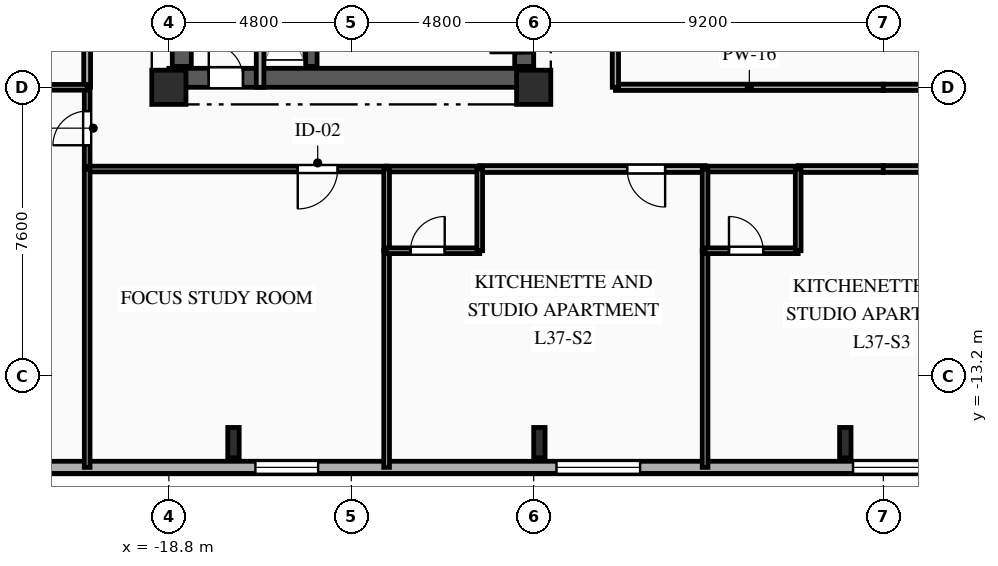
"""IFC4 building model, lengths in metres.
Left out: names, types, materials, properties, quantities, classifications, styles, units other than length and angle.
Written with IfcOpenShell. Run it as: python <this file> out.ifc"""

import sys

from ifc_helpers import new_model, si_unit, direction, frame, frame_2d, origin, origin_2d, place, context, subcontext, project, spatial, rectangle, i_section, extrude, element, fill, save


model = new_model("IFC4")
c1 = context("Model", 3, precision=1e-05, world=origin(), true_north=direction((0.0, 1.0)))
c2 = subcontext(c1, "Body", "Model", "MODEL_VIEW")
j1 = project(units=[si_unit("LENGTHUNIT", "METRE"), si_unit("PLANEANGLEUNIT", "RADIAN")], contexts=[c1])
p1 = place(None, origin())
s1 = spatial("IfcSite", under=j1, at=p1, CompositionType="ELEMENT")
p2 = place(p1, origin())
s2 = spatial("IfcBuilding", under=s1, at=p2, CompositionType="ELEMENT")
p3 = place(p2, frame((0.0, 0.0, 134.35)))
s3 = spatial("IfcBuildingStorey", under=s2, at=p3, CompositionType="ELEMENT", Elevation=134.35)
for number, where, z_axis, x_axis in (
    (1, (-18.8, -5.6, 0.0), (0.0, 0.0, 1.0), (1.0, 0.0, 0.0)),
    (2, (-9.2, -5.6, 0.0), (0.0, 0.0, 1.0), (1.0, 0.0, 0.0)),
):
    element("IfcColumn", number, at=place(p3, frame(where, z_axis=z_axis, x_axis=x_axis)), inside=s3, PredefinedType="COLUMN", context=c2, shape_type="SweptSolid", body=[
        extrude(rectangle(XDim=0.9, YDim=0.9, at=origin_2d()), origin(), (0.0, 0.0, 1.0), 3.35),
    ])
for number, where, z_axis, x_axis in (
    (3, (-17.1, -14.95, 0.0), (0.0, 0.0, 1.0), (1.0, 0.0, 0.0)),
    (4, (-9.05, -14.95, 0.0), (0.0, 0.0, 1.0), (1.0, 0.0, 0.0)),
    (5, (-1.0, -14.95, 0.0), (0.0, 0.0, 1.0), (1.0, 0.0, 0.0)),
):
    element("IfcColumn", number, at=place(p3, frame(where, z_axis=z_axis, x_axis=x_axis)), inside=s3, PredefinedType="COLUMN", context=c2, shape_type="SweptSolid", body=[
        extrude(i_section(OverallWidth=0.3, OverallDepth=0.8, WebThickness=0.018, FlangeThickness=0.033, FilletRadius=0.03, at=origin_2d()), origin(), (0.0, 0.0, 1.0), 3.35),
    ])
p4 = place(p3, frame((23.8, -15.6, 0.0), z_axis=(0.0, 0.0, 1.0), x_axis=(-1.0, 0.0, 0.0)))
e6 = element("IfcWall", 6, at=p4, inside=s3, PredefinedType="SOLIDWALL", context=c2, shape_type="SweptSolid", body=[
    extrude(rectangle(XDim=49.6, YDim=0.32, at=frame_2d((24.8, 0.0))), origin(), (0.0, 0.0, 1.0), 3.04),
])
p5 = place(p4, frame((1.13, 0.0, 0.85)))
e7 = element("IfcOpeningElement", 7, at=p5, cuts=e6, PredefinedType="OPENING", context=c2, shape_type="SweptSolid", body=[
    extrude(rectangle(XDim=1.1, YDim=1.85, at=frame_2d((0.55, 0.925))), frame((0.0, 0.17, 0.0), z_axis=(0.0, -1.0, 0.0), x_axis=(1.0, 0.0, 0.0)), (0.0, 0.0, 1.0), 0.34),
])
p6 = place(p4, frame((6.495, 0.0, 0.85)))
e8 = element("IfcOpeningElement", 8, at=p6, cuts=e6, PredefinedType="OPENING", context=c2, shape_type="SweptSolid", body=[
    extrude(rectangle(XDim=1.65, YDim=1.85, at=frame_2d((0.825, 0.925))), frame((0.0, 0.17, 0.0), z_axis=(0.0, -1.0, 0.0), x_axis=(1.0, 0.0, 0.0)), (0.0, 0.0, 1.0), 0.34),
])
p7 = place(p4, frame((13.996, 0.0, 0.85)))
e9 = element("IfcOpeningElement", 9, at=p7, cuts=e6, PredefinedType="OPENING", context=c2, shape_type="SweptSolid", body=[
    extrude(rectangle(XDim=2.2, YDim=1.85, at=frame_2d((1.1, 0.925))), frame((0.0, 0.17, 0.0), z_axis=(0.0, -1.0, 0.0), x_axis=(1.0, 0.0, 0.0)), (0.0, 0.0, 1.0), 0.34),
])
p8 = place(p4, frame((22.396, 0.0, 0.85)))
e10 = element("IfcOpeningElement", 10, at=p8, cuts=e6, PredefinedType="OPENING", context=c2, shape_type="SweptSolid", body=[
    extrude(rectangle(XDim=2.2, YDim=1.85, at=frame_2d((1.1, 0.925))), frame((0.0, 0.17, 0.0), z_axis=(0.0, -1.0, 0.0), x_axis=(1.0, 0.0, 0.0)), (0.0, 0.0, 1.0), 0.34),
])
p9 = place(p4, frame((30.2, 0.0, 0.85)))
e11 = element("IfcOpeningElement", 11, at=p9, cuts=e6, PredefinedType="OPENING", context=c2, shape_type="SweptSolid", body=[
    extrude(rectangle(XDim=2.2, YDim=1.85, at=frame_2d((1.1, 0.925))), frame((0.0, 0.17, 0.0), z_axis=(0.0, -1.0, 0.0), x_axis=(1.0, 0.0, 0.0)), (0.0, 0.0, 1.0), 0.34),
])
p10 = place(p4, frame((38.673, 0.0, 0.85)))
e12 = element("IfcOpeningElement", 12, at=p10, cuts=e6, PredefinedType="OPENING", context=c2, shape_type="SweptSolid", body=[
    extrude(rectangle(XDim=1.65, YDim=1.85, at=frame_2d((0.825, 0.925))), frame((0.0, 0.17, 0.0), z_axis=(0.0, -1.0, 0.0), x_axis=(1.0, 0.0, 0.0)), (0.0, 0.0, 1.0), 0.34),
])
p11 = place(p4, frame((46.175, 0.0, 0.85)))
e13 = element("IfcOpeningElement", 13, at=p11, cuts=e6, PredefinedType="OPENING", context=c2, shape_type="SweptSolid", body=[
    extrude(rectangle(XDim=1.65, YDim=1.85, at=frame_2d((0.825, 0.925))), frame((0.0, 0.17, 0.0), z_axis=(0.0, -1.0, 0.0), x_axis=(1.0, 0.0, 0.0)), (0.0, 0.0, 1.0), 0.34),
])
p12 = place(p3, frame((-18.8, -5.35, 0.0), z_axis=(0.0, 0.0, 1.0), x_axis=(1.0, 0.0, 0.0)))
e14 = element("IfcWall", 14, at=p12, inside=s3, PredefinedType="SHEAR", context=c2, shape_type="SweptSolid", body=[
    extrude(rectangle(XDim=9.6, YDim=0.5, at=frame_2d((4.8, 0.0))), origin(), (0.0, 0.0, 1.0), 3.04),
])
p13 = place(p12, frame((1.05, 0.0, 0.0)))
e15 = element("IfcOpeningElement", 15, at=p13, cuts=e14, PredefinedType="OPENING", context=c2, shape_type="SweptSolid", body=[
    extrude(rectangle(XDim=0.9, YDim=2.1, at=frame_2d((0.45, 1.05))), frame((0.0, 0.26, 0.0), z_axis=(0.0, -1.0, 0.0), x_axis=(1.0, 0.0, 0.0)), (0.0, 0.0, 1.0), 0.52),
])
p14 = place(p3, frame((-18.46, -5.05, 0.0), z_axis=(0.0, 0.0, 1.0), x_axis=(0.0, 1.0, 0.0)))
e16 = element("IfcWall", 16, at=p14, inside=s3, PredefinedType="SHEAR", context=c2, shape_type="SweptSolid", body=[
    extrude(rectangle(XDim=10.1, YDim=0.5, at=frame_2d((5.05, 0.0))), origin(), (0.0, 0.0, 1.0), 3.04),
])
p15 = place(p3, frame((-9.45, -5.05, 0.0), z_axis=(0.0, 0.0, 1.0), x_axis=(0.0, 1.0, 0.0)))
e17 = element("IfcWall", 17, at=p15, inside=s3, PredefinedType="SHEAR", context=c2, shape_type="SweptSolid", body=[
    extrude(rectangle(XDim=10.1, YDim=0.5, at=frame_2d((5.05, 0.0))), origin(), (0.0, 0.0, 1.0), 3.04),
])
p16 = place(p15, frame((7.15, 0.0, 0.0)))
e18 = element("IfcOpeningElement", 18, at=p16, cuts=e17, PredefinedType="OPENING", context=c2, shape_type="SweptSolid", body=[
    extrude(rectangle(XDim=0.9, YDim=2.1, at=frame_2d((0.45, 1.05))), frame((0.0, 0.26, 0.0), z_axis=(0.0, -1.0, 0.0), x_axis=(1.0, 0.0, 0.0)), (0.0, 0.0, 1.0), 0.52),
])
p17 = place(p15, frame((2.4, 0.0, 0.0)))
e19 = element("IfcOpeningElement", 19, at=p17, cuts=e17, PredefinedType="OPENING", context=c2, shape_type="SweptSolid", body=[
    extrude(rectangle(XDim=1.2, YDim=2.15, at=frame_2d((0.6, 1.075))), frame((0.0, 0.26, 0.0), z_axis=(0.0, -1.0, 0.0), x_axis=(1.0, 0.0, 0.0)), (0.0, 0.0, 1.0), 0.52),
])
p18 = place(p15, frame((0.35, 0.0, 0.0)))
e20 = element("IfcOpeningElement", 20, at=p18, cuts=e17, PredefinedType="OPENING", context=c2, shape_type="SweptSolid", body=[
    extrude(rectangle(XDim=0.9, YDim=2.1, at=frame_2d((0.45, 1.05))), frame((0.0, 0.26, 0.0), z_axis=(0.0, -1.0, 0.0), x_axis=(1.0, 0.0, 0.0)), (0.0, 0.0, 1.0), 0.52),
])
p19 = place(p15, frame((5.0, 0.0, 0.0)))
e21 = element("IfcOpeningElement", 21, at=p19, cuts=e17, PredefinedType="OPENING", context=c2, shape_type="SweptSolid", body=[
    extrude(rectangle(XDim=0.9, YDim=2.1, at=frame_2d((0.45, 1.05))), frame((0.0, 0.26, 0.0), z_axis=(0.0, -1.0, 0.0), x_axis=(1.0, 0.0, 0.0)), (0.0, 0.0, 1.0), 0.52),
])
p20 = place(p3, frame((-15.05, -5.05, 0.0), z_axis=(0.0, 0.0, 1.0), x_axis=(0.0, 1.0, 0.0)))
e22 = element("IfcWall", 22, at=p20, inside=s3, PredefinedType="SHEAR", context=c2, shape_type="SweptSolid", body=[
    extrude(rectangle(XDim=10.1, YDim=0.3, at=frame_2d((5.05, 0.0))), origin(), (0.0, 0.0, 1.0), 3.04),
])
p21 = place(p3, frame((-16.4, -5.6, 0.0), z_axis=(0.0, 0.0, 1.0), x_axis=(0.0, 1.0, 0.0)))
e23 = element("IfcWall", 23, at=p21, inside=s3, PredefinedType="PARTITIONING", context=c2, shape_type="SweptSolid", body=[
    extrude(rectangle(XDim=3.49, YDim=0.2, at=frame_2d((1.745, 0.0))), origin(), (0.0, 0.0, 1.0), 3.04),
])
p22 = place(p3, frame((-20.95, -7.75, 0.0), z_axis=(0.0, 0.0, 1.0), x_axis=(0.0, 1.0, 0.0)))
e24 = element("IfcWall", 24, at=p22, inside=s3, PredefinedType="PARTITIONING", context=c2, shape_type="SweptSolid", body=[
    extrude(rectangle(XDim=2.15, YDim=0.15, at=frame_2d((1.075, 0.0))), origin(), (0.0, 0.0, 1.0), 3.04),
])
p23 = place(p22, frame((0.625, 0.0, 0.0)))
e25 = element("IfcOpeningElement", 25, at=p23, cuts=e24, PredefinedType="OPENING", context=c2, shape_type="SweptSolid", body=[
    extrude(rectangle(XDim=0.9, YDim=2.1, at=frame_2d((0.45, 1.05))), frame((0.0, 0.085, 0.0), z_axis=(0.0, -1.0, 0.0), x_axis=(1.0, 0.0, 0.0)), (0.0, 0.0, 1.0), 0.17),
])
p24 = place(p3, frame((-13.07, -7.75, 0.0), z_axis=(0.0, 0.0, 1.0), x_axis=(-1.0, 0.0, 0.0)))
e26 = element("IfcWall", 26, at=p24, inside=s3, PredefinedType="PARTITIONING", context=c2, shape_type="SweptSolid", body=[
    extrude(rectangle(XDim=7.88, YDim=0.15, at=frame_2d((3.94, 0.0))), origin(), (0.0, 0.0, 1.0), 3.04),
])
p25 = place(p24, frame((1.289, 0.0, 0.0)))
e27 = element("IfcOpeningElement", 27, at=p25, cuts=e26, PredefinedType="OPENING", context=c2, shape_type="SweptSolid", body=[
    extrude(rectangle(XDim=1.05, YDim=2.15, at=frame_2d((0.525, 1.075))), frame((0.0, 0.085, 0.0), z_axis=(0.0, -1.0, 0.0), x_axis=(1.0, 0.0, 0.0)), (0.0, 0.0, 1.0), 0.17),
])
p26 = place(p3, frame((-4.69, -7.75, 0.0), z_axis=(0.0, 0.0, 1.0), x_axis=(-1.0, 0.0, 0.0)))
e28 = element("IfcWall", 28, at=p26, inside=s3, PredefinedType="PARTITIONING", context=c2, shape_type="SweptSolid", body=[
    extrude(rectangle(XDim=5.93, YDim=0.18, at=frame_2d((2.965, 0.0))), origin(), (0.0, 0.0, 1.0), 3.04),
])
p27 = place(p26, frame((1.051, 0.0, 0.0)))
e29 = element("IfcOpeningElement", 29, at=p27, cuts=e28, PredefinedType="OPENING", context=c2, shape_type="SweptSolid", body=[
    extrude(rectangle(XDim=1.0, YDim=2.15, at=frame_2d((0.5, 1.075))), frame((0.0, 0.1, 0.0), z_axis=(0.0, -1.0, 0.0), x_axis=(1.0, 0.0, 0.0)), (0.0, 0.0, 1.0), 0.2),
])
p28 = place(p3, frame((-10.62, -7.75, 0.0), z_axis=(0.0, 0.0, 1.0), x_axis=(-1.0, 0.0, 0.0)))
e30 = element("IfcWall", 30, at=p28, inside=s3, PredefinedType="PLUMBINGWALL", context=c2, shape_type="SweptSolid", body=[
    extrude(rectangle(XDim=2.45, YDim=0.15, at=frame_2d((1.225, 0.0))), origin(), (0.0, 0.0, 1.0), 3.04),
])
p29 = place(p3, frame((0.0, -7.75, 0.0), z_axis=(0.0, 0.0, 1.0), x_axis=(-1.0, 0.0, 0.0)))
e31 = element("IfcWall", 31, at=p29, inside=s3, PredefinedType="PARTITIONING", context=c2, shape_type="SweptSolid", body=[
    extrude(rectangle(XDim=2.24, YDim=0.18, at=frame_2d((1.12, 0.0))), origin(), (0.0, 0.0, 1.0), 3.04),
])
p30 = place(p3, frame((-2.24, -7.75, 0.0), z_axis=(0.0, 0.0, 1.0), x_axis=(-1.0, 0.0, 0.0)))
e32 = element("IfcWall", 32, at=p30, inside=s3, PredefinedType="PLUMBINGWALL", context=c2, shape_type="SweptSolid", body=[
    extrude(rectangle(XDim=2.45, YDim=0.15, at=frame_2d((1.225, 0.0))), origin(), (0.0, 0.0, 1.0), 3.04),
])
p31 = place(p3, frame((-7.05, -5.6, 0.0), z_axis=(0.0, 0.0, 1.0), x_axis=(1.0, 0.0, 0.0)))
e33 = element("IfcWall", 33, at=p31, inside=s3, PredefinedType="PARTITIONING", context=c2, shape_type="SweptSolid", body=[
    extrude(rectangle(XDim=7.05, YDim=0.165, at=frame_2d((3.525, 0.0))), origin(), (0.0, 0.0, 1.0), 2.525),
])
p32 = place(p3, frame((3.69, -7.75, 0.0), z_axis=(0.0, 0.0, 1.0), x_axis=(-1.0, 0.0, 0.0)))
e34 = element("IfcWall", 34, at=p32, inside=s3, PredefinedType="PARTITIONING", context=c2, shape_type="SweptSolid", body=[
    extrude(rectangle(XDim=3.69, YDim=0.18, at=frame_2d((1.845, 0.0))), origin(), (0.0, 0.0, 1.0), 3.04),
])
p33 = place(p32, frame((1.536, 0.0, 0.0)))
e35 = element("IfcOpeningElement", 35, at=p33, cuts=e34, PredefinedType="OPENING", context=c2, shape_type="SweptSolid", body=[
    extrude(rectangle(XDim=1.0, YDim=2.15, at=frame_2d((0.5, 1.075))), frame((0.0, 0.1, 0.0), z_axis=(0.0, -1.0, 0.0), x_axis=(1.0, 0.0, 0.0)), (0.0, 0.0, 1.0), 0.2),
])
p34 = place(p3, frame((0.0, -5.6, 0.0), z_axis=(0.0, 0.0, 1.0), x_axis=(1.0, 0.0, 0.0)))
e36 = element("IfcWall", 36, at=p34, inside=s3, PredefinedType="PARTITIONING", context=c2, shape_type="SweptSolid", body=[
    extrude(rectangle(XDim=7.05, YDim=0.165, at=frame_2d((3.525, 0.0))), origin(), (0.0, 0.0, 1.0), 2.525),
])
p35 = place(p3, frame((-20.95, -5.6, 0.0), z_axis=(0.0, 0.0, 1.0), x_axis=(0.0, 1.0, 0.0)))
e37 = element("IfcWall", 37, at=p35, inside=s3, PredefinedType="PARTITIONING", context=c2, shape_type="SweptSolid", body=[
    extrude(rectangle(XDim=14.1, YDim=0.18, at=frame_2d((7.05, 0.0))), origin(), (0.0, 0.0, 1.0), 3.04),
])
p36 = place(p35, frame((5.058, 0.0, 0.0)))
e38 = element("IfcOpeningElement", 38, at=p36, cuts=e37, PredefinedType="OPENING", context=c2, shape_type="SweptSolid", body=[
    extrude(rectangle(XDim=1.0, YDim=2.15, at=frame_2d((0.5, 1.075))), frame((0.0, 0.1, 0.0), z_axis=(0.0, -1.0, 0.0), x_axis=(1.0, 0.0, 0.0)), (0.0, 0.0, 1.0), 0.2),
])
p37 = place(p3, frame((-7.05, -2.95, 0.0), z_axis=(0.0, 0.0, 1.0), x_axis=(0.0, -1.0, 0.0)))
e39 = element("IfcWall", 39, at=p37, inside=s3, PredefinedType="PARTITIONING", context=c2, shape_type="SweptSolid", body=[
    extrude(rectangle(XDim=2.65, YDim=0.165, at=frame_2d((1.325, 0.0))), origin(), (0.0, 0.0, 1.0), 3.04),
])
p38 = place(p3, frame((-20.95, -5.6, 0.0), z_axis=(0.0, 0.0, 1.0), x_axis=(-1.0, 0.0, 0.0)))
e40 = element("IfcWall", 40, at=p38, inside=s3, PredefinedType="PARTITIONING", context=c2, shape_type="SweptSolid", body=[
    extrude(rectangle(XDim=2.65, YDim=0.15, at=frame_2d((1.325, 0.0))), origin(), (0.0, 0.0, 1.0), 3.04),
])
p39 = place(p38, frame((0.965, 0.0, 0.0)))
e41 = element("IfcOpeningElement", 41, at=p39, cuts=e40, PredefinedType="OPENING", context=c2, shape_type="SweptSolid", body=[
    extrude(rectangle(XDim=1.05, YDim=2.15, at=frame_2d((0.525, 1.075))), frame((0.0, 0.085, 0.0), z_axis=(0.0, -1.0, 0.0), x_axis=(1.0, 0.0, 0.0)), (0.0, 0.0, 1.0), 0.17),
])
p40 = place(p3, frame((-20.95, -7.75, 0.0), z_axis=(0.0, 0.0, 1.0), x_axis=(0.0, -1.0, 0.0)))
e42 = element("IfcWall", 42, at=p40, inside=s3, PredefinedType="PARTITIONING", context=c2, shape_type="SweptSolid", body=[
    extrude(rectangle(XDim=7.85, YDim=0.15, at=frame_2d((3.925, 0.0))), origin(), (0.0, 0.0, 1.0), 3.04),
])
p41 = place(p3, frame((-13.07, -9.9, 0.0), z_axis=(0.0, 0.0, 1.0), x_axis=(0.0, -1.0, 0.0)))
e43 = element("IfcWall", 43, at=p41, inside=s3, PredefinedType="PARTITIONING", context=c2, shape_type="SweptSolid", body=[
    extrude(rectangle(XDim=5.7, YDim=0.15, at=frame_2d((2.85, 0.0))), origin(), (0.0, 0.0, 1.0), 3.04),
])
p42 = place(p3, frame((-13.07, -7.75, 0.0), z_axis=(0.0, 0.0, 1.0), x_axis=(0.0, -1.0, 0.0)))
e44 = element("IfcWall", 44, at=p42, inside=s3, PredefinedType="PLUMBINGWALL", context=c2, shape_type="SweptSolid", body=[
    extrude(rectangle(XDim=2.15, YDim=0.15, at=frame_2d((1.075, 0.0))), origin(), (0.0, 0.0, 1.0), 3.04),
])
p43 = place(p3, frame((-13.07, -9.9, 0.0), z_axis=(0.0, 0.0, 1.0), x_axis=(1.0, 0.0, 0.0)))
e45 = element("IfcWall", 45, at=p43, inside=s3, PredefinedType="PLUMBINGWALL", context=c2, shape_type="SweptSolid", body=[
    extrude(rectangle(XDim=2.45, YDim=0.15, at=frame_2d((1.225, 0.0))), origin(), (0.0, 0.0, 1.0), 3.04),
])
p44 = place(p43, frame((0.629, 0.0, 0.0)))
e46 = element("IfcOpeningElement", 46, at=p44, cuts=e45, PredefinedType="OPENING", context=c2, shape_type="SweptSolid", body=[
    extrude(rectangle(XDim=0.9, YDim=2.1, at=frame_2d((0.45, 1.05))), frame((0.0, 0.085, 0.0), z_axis=(0.0, -1.0, 0.0), x_axis=(1.0, 0.0, 0.0)), (0.0, 0.0, 1.0), 0.17),
])
p45 = place(p3, frame((-10.62, -9.9, 0.0), z_axis=(0.0, 0.0, 1.0), x_axis=(0.0, 1.0, 0.0)))
e47 = element("IfcWall", 47, at=p45, inside=s3, PredefinedType="PLUMBINGWALL", context=c2, shape_type="SweptSolid", body=[
    extrude(rectangle(XDim=2.15, YDim=0.15, at=frame_2d((1.075, 0.0))), origin(), (0.0, 0.0, 1.0), 3.04),
])
p46 = place(p3, frame((-4.69, -9.9, 0.0), z_axis=(0.0, 0.0, 1.0), x_axis=(0.0, -1.0, 0.0)))
e48 = element("IfcWall", 48, at=p46, inside=s3, PredefinedType="PARTITIONING", context=c2, shape_type="SweptSolid", body=[
    extrude(rectangle(XDim=5.7, YDim=0.15, at=frame_2d((2.85, 0.0))), origin(), (0.0, 0.0, 1.0), 3.04),
])
p47 = place(p3, frame((-4.69, -7.75, 0.0), z_axis=(0.0, 0.0, 1.0), x_axis=(0.0, -1.0, 0.0)))
e49 = element("IfcWall", 49, at=p47, inside=s3, PredefinedType="PLUMBINGWALL", context=c2, shape_type="SweptSolid", body=[
    extrude(rectangle(XDim=2.15, YDim=0.15, at=frame_2d((1.075, 0.0))), origin(), (0.0, 0.0, 1.0), 3.04),
])
p48 = place(p3, frame((-4.69, -9.9, 0.0), z_axis=(0.0, 0.0, 1.0), x_axis=(1.0, 0.0, 0.0)))
e50 = element("IfcWall", 50, at=p48, inside=s3, PredefinedType="PLUMBINGWALL", context=c2, shape_type="SweptSolid", body=[
    extrude(rectangle(XDim=2.45, YDim=0.15, at=frame_2d((1.225, 0.0))), origin(), (0.0, 0.0, 1.0), 3.04),
])
p49 = place(p48, frame((0.629, 0.0, 0.0)))
e51 = element("IfcOpeningElement", 51, at=p49, cuts=e50, PredefinedType="OPENING", context=c2, shape_type="SweptSolid", body=[
    extrude(rectangle(XDim=0.9, YDim=2.1, at=frame_2d((0.45, 1.05))), frame((0.0, 0.085, 0.0), z_axis=(0.0, -1.0, 0.0), x_axis=(1.0, 0.0, 0.0)), (0.0, 0.0, 1.0), 0.17),
])
p50 = place(p3, frame((-2.24, -9.9, 0.0), z_axis=(0.0, 0.0, 1.0), x_axis=(0.0, 1.0, 0.0)))
e52 = element("IfcWall", 52, at=p50, inside=s3, PredefinedType="PLUMBINGWALL", context=c2, shape_type="SweptSolid", body=[
    extrude(rectangle(XDim=2.15, YDim=0.15, at=frame_2d((1.075, 0.0))), origin(), (0.0, 0.0, 1.0), 3.04),
])
p51 = place(p8, origin())
e53 = element("IfcWindow", 53, at=p51, inside=s3, PartitioningType="SINGLE_PANEL", PredefinedType="WINDOW", context=c2, shape_type="SweptSolid", body=[
    extrude(rectangle(XDim=2.2, YDim=1.85, at=frame_2d((1.1, 0.925))), frame((0.0, 0.03, 0.0), z_axis=(0.0, -1.0, 0.0), x_axis=(1.0, 0.0, 0.0)), (0.0, 0.0, 1.0), 0.06),
])
fill(e10, e53)
p52 = place(p9, origin())
e54 = element("IfcWindow", 54, at=p52, inside=s3, PartitioningType="SINGLE_PANEL", PredefinedType="WINDOW", context=c2, shape_type="SweptSolid", body=[
    extrude(rectangle(XDim=2.2, YDim=1.85, at=frame_2d((1.1, 0.925))), frame((0.0, 0.03, 0.0), z_axis=(0.0, -1.0, 0.0), x_axis=(1.0, 0.0, 0.0)), (0.0, 0.0, 1.0), 0.06),
])
fill(e11, e54)
p53 = place(p10, origin())
e55 = element("IfcWindow", 55, at=p53, inside=s3, PartitioningType="SINGLE_PANEL", PredefinedType="WINDOW", context=c2, shape_type="SweptSolid", body=[
    extrude(rectangle(XDim=1.65, YDim=1.85, at=frame_2d((0.825, 0.925))), frame((0.0, 0.03, 0.0), z_axis=(0.0, -1.0, 0.0), x_axis=(1.0, 0.0, 0.0)), (0.0, 0.0, 1.0), 0.06),
])
fill(e12, e55)
p54 = place(p13, origin())
e56 = element("IfcDoor", 56, at=p54, inside=s3, OperationType="SINGLE_SWING_LEFT", PredefinedType="DOOR", context=c2, shape_type="SweptSolid", body=[
    extrude(rectangle(XDim=0.9, YDim=2.1, at=frame_2d((0.45, 1.05))), frame((0.0, 0.025, 0.0), z_axis=(0.0, -1.0, 0.0), x_axis=(1.0, 0.0, 0.0)), (0.0, 0.0, 1.0), 0.05),
])
fill(e15, e56)
p55 = place(p18, origin())
e57 = element("IfcDoor", 57, at=p55, inside=s3, OperationType="SINGLE_SWING_LEFT", PredefinedType="DOOR", context=c2, shape_type="SweptSolid", body=[
    extrude(rectangle(XDim=0.9, YDim=2.1, at=frame_2d((0.45, 1.05))), frame((0.0, 0.025, 0.0), z_axis=(0.0, -1.0, 0.0), x_axis=(1.0, 0.0, 0.0)), (0.0, 0.0, 1.0), 0.05),
])
fill(e20, e57)
p56 = place(p23, origin())
e58 = element("IfcDoor", 58, at=p56, inside=s3, OperationType="SINGLE_SWING_LEFT", PredefinedType="DOOR", context=c2, shape_type="SweptSolid", body=[
    extrude(rectangle(XDim=0.9, YDim=2.1, at=frame_2d((0.45, 1.05))), frame((0.0, 0.025, 0.0), z_axis=(0.0, -1.0, 0.0), x_axis=(1.0, 0.0, 0.0)), (0.0, 0.0, 1.0), 0.05),
])
fill(e25, e58)
p57 = place(p25, origin())
e59 = element("IfcDoor", 59, at=p57, inside=s3, OperationType="SINGLE_SWING_RIGHT", PredefinedType="DOOR", context=c2, shape_type="SweptSolid", body=[
    extrude(rectangle(XDim=1.05, YDim=2.15, at=frame_2d((0.525, 1.075))), frame((0.0, 0.025, 0.0), z_axis=(0.0, -1.0, 0.0), x_axis=(1.0, 0.0, 0.0)), (0.0, 0.0, 1.0), 0.05),
])
fill(e27, e59)
p58 = place(p27, origin())
e60 = element("IfcDoor", 60, at=p58, inside=s3, OperationType="SINGLE_SWING_LEFT", PredefinedType="DOOR", context=c2, shape_type="SweptSolid", body=[
    extrude(rectangle(XDim=1.0, YDim=2.15, at=frame_2d((0.5, 1.075))), frame((0.0, 0.025, 0.0), z_axis=(0.0, -1.0, 0.0), x_axis=(1.0, 0.0, 0.0)), (0.0, 0.0, 1.0), 0.05),
])
fill(e29, e60)
p59 = place(p44, origin())
e61 = element("IfcDoor", 61, at=p59, inside=s3, OperationType="SINGLE_SWING_RIGHT", PredefinedType="DOOR", context=c2, shape_type="SweptSolid", body=[
    extrude(rectangle(XDim=0.9, YDim=2.1, at=frame_2d((0.45, 1.05))), frame((0.0, 0.025, 0.0), z_axis=(0.0, -1.0, 0.0), x_axis=(1.0, 0.0, 0.0)), (0.0, 0.0, 1.0), 0.05),
])
fill(e46, e61)
p60 = place(p49, origin())
e62 = element("IfcDoor", 62, at=p60, inside=s3, OperationType="SINGLE_SWING_LEFT", PredefinedType="DOOR", context=c2, shape_type="SweptSolid", body=[
    extrude(rectangle(XDim=0.9, YDim=2.1, at=frame_2d((0.45, 1.05))), frame((0.0, 0.025, 0.0), z_axis=(0.0, -1.0, 0.0), x_axis=(1.0, 0.0, 0.0)), (0.0, 0.0, 1.0), 0.05),
])
fill(e51, e62)
save(model, sys.argv[1])
